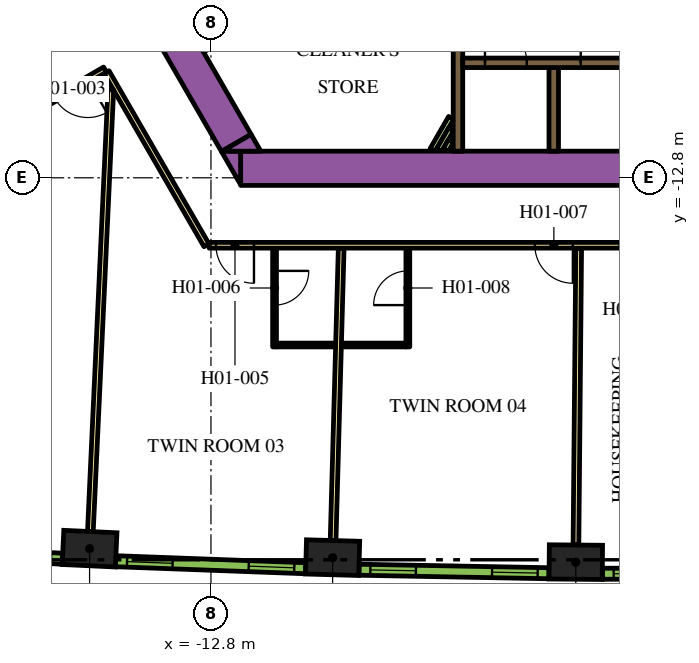
"""IFC4 building model, lengths in metres.
Left out: names, types, materials, properties, quantities, classifications, styles, units other than length and angle.
Written with IfcOpenShell. Run it as: python <this file> out.ifc"""

import sys

from ifc_helpers import new_model, si_unit, direction, frame, frame_2d, origin, origin_2d, place, context, subcontext, project, spatial, polyline, rectangle, outline, extrude, element, fill, save


model = new_model("IFC4")
c1 = context("Model", 3, precision=1e-05, world=origin(), true_north=direction((0.0, 1.0)))
c2 = subcontext(c1, "Body", "Model", "MODEL_VIEW")
j1 = project(units=[si_unit("LENGTHUNIT", "METRE"), si_unit("PLANEANGLEUNIT", "RADIAN")], contexts=[c1])
p1 = place(None, origin())
s1 = spatial("IfcSite", under=j1, at=p1, CompositionType="ELEMENT")
p2 = place(p1, origin())
s2 = spatial("IfcBuilding", under=s1, at=p2, CompositionType="ELEMENT")
p3 = place(p2, frame((0.0, 0.0, 35.4)))
s3 = spatial("IfcBuildingStorey", under=s2, at=p3, CompositionType="ELEMENT", Elevation=35.4)
for number, where, z_axis, x_axis in (
    (1, (-15.994, -22.558, 0.0), (0.0, 0.0, 1.0), (0.999, -0.046, 0.0)),
    (2, (-9.599, -22.795, 0.0), (0.0, 0.0, 1.0), (1.0, -0.028, 0.0)),
    (3, (-3.2, -22.913, 0.0), (0.0, 0.0, 1.0), (1.0, -0.009, 0.0)),
):
    element("IfcColumn", number, at=place(p3, frame(where, z_axis=z_axis, x_axis=x_axis)), inside=s3, PredefinedType="COLUMN", context=c2, shape_type="SweptSolid", body=[
        extrude(rectangle(XDim=1.4, YDim=0.9, at=origin_2d()), origin(), (0.0, 0.0, 1.0), 3.9),
    ])
p4 = place(p3, frame((-12.019, -12.55, 0.0), z_axis=(0.0, 0.0, 1.0), x_axis=(1.0, 0.0, 0.0)))
e4 = element("IfcWall", 4, at=p4, inside=s3, PredefinedType="SOLIDWALL", context=c2, shape_type="SweptSolid", body=[
    extrude(rectangle(XDim=21.63, YDim=0.9, at=frame_2d((10.815, 0.0))), origin(), (0.0, 0.0, 1.0), 3.9),
])
p5 = place(p3, origin())
e5 = element("IfcWall", 5, at=p5, inside=s3, PredefinedType="SOLIDWALL", context=c2, shape_type="SweptSolid", body=[
    extrude(outline(polyline([(-12.529, -12.1), (-12.021, -12.1), (-12.021, -12.98), (-12.529, -12.1)])), origin(), (0.0, 0.0, 1.0), 3.9),
])
p6 = place(p3, frame((-12.134, -11.883, 0.0), z_axis=(0.0, 0.0, 1.0), x_axis=(-0.500005339912, 0.866022320763, 0.0)))
e6 = element("IfcWall", 6, at=p6, inside=s3, PredefinedType="SOLIDWALL", context=c2, shape_type="SweptSolid", body=[
    extrude(rectangle(XDim=9.488, YDim=0.9, at=frame_2d((4.744, 0.0))), origin(), (0.0, 0.0, 1.0), 3.9),
])
e7 = element("IfcWall", 7, at=p5, inside=s3, PredefinedType="SOLIDWALL", context=c2, shape_type="SweptSolid", body=[
    extrude(outline(polyline([(-11.489, -12.1), (-12.505, -12.1), (-11.743, -11.66), (-11.489, -12.1)])), origin(), (0.0, 0.0, 1.0), 3.9),
])
p7 = place(p3, frame((-3.78, -12.1, 0.0), z_axis=(0.0, 0.0, 1.0), x_axis=(0.0, 1.0, 0.0)))
e8 = element("IfcWall", 8, at=p7, inside=s3, PredefinedType="SOLIDWALL", context=c2, shape_type="SweptSolid", body=[
    extrude(rectangle(XDim=2.2, YDim=0.25, at=frame_2d((1.1, 0.0))), origin(), (0.0, 0.0, 1.0), 3.9),
])
p8 = place(p3, frame((-6.3, -12.1, 0.0), z_axis=(0.0, 0.0, 1.0), x_axis=(0.0, 1.0, 0.0)))
e9 = element("IfcWall", 9, at=p8, inside=s3, PredefinedType="SOLIDWALL", context=c2, shape_type="SweptSolid", body=[
    extrude(rectangle(XDim=3.146, YDim=0.25, at=frame_2d((1.573, 0.0))), origin(), (0.0, 0.0, 1.0), 3.9),
])
p9 = place(p3, frame((-6.968, -12.068, 0.0), z_axis=(0.0, 0.0, 1.0), x_axis=(0.49998975084, 0.866031321059, 0.0)))
e10 = element("IfcWall", 10, at=p9, inside=s3, PredefinedType="PARTITIONING", context=c2, shape_type="SweptSolid", body=[
    extrude(rectangle(XDim=0.975, YDim=0.15, at=frame_2d((0.488, 0.0))), origin(), (0.0, 0.0, 1.0), 2.75),
])
p10 = place(p3, frame((-6.794, -12.068, 0.0), z_axis=(0.0, 0.0, 1.0), x_axis=(0.49985693963, 0.866107983974, 0.0)))
e11 = element("IfcWall", 11, at=p10, inside=s3, PredefinedType="PARTITIONING", context=c2, shape_type="SweptSolid", body=[
    extrude(rectangle(XDim=0.629, YDim=0.15, at=frame_2d((0.314, 0.0))), origin(), (0.0, 0.0, 1.0), 2.75),
])
p11 = place(p3, frame((-6.621, -12.068, 0.0), z_axis=(0.0, 0.0, 1.0), x_axis=(0.500046963369, 0.865998287773, 0.0)))
e12 = element("IfcWall", 12, at=p11, inside=s3, PredefinedType="PARTITIONING", context=c2, shape_type="SweptSolid", body=[
    extrude(rectangle(XDim=0.282, YDim=0.15, at=frame_2d((0.141, 0.0))), origin(), (0.0, 0.0, 1.0), 2.75),
])
p12 = place(p3, frame((-6.175, -9.775, 0.0), z_axis=(0.0, 0.0, 1.0), x_axis=(1.0, 0.0, 0.0)))
e13 = element("IfcWall", 13, at=p12, inside=s3, PredefinedType="SOLIDWALL", context=c2, shape_type="SweptSolid", body=[
    extrude(rectangle(XDim=12.35, YDim=0.25, at=frame_2d((6.175, 0.0))), origin(), (0.0, 0.0, 1.0), 3.9),
])
p13 = place(p12, frame((0.585, 0.0, 0.0)))
e14 = element("IfcOpeningElement", 14, at=p13, cuts=e13, PredefinedType="OPENING", context=c2, shape_type="SweptSolid", body=[
    extrude(rectangle(XDim=1.1, YDim=2.1, at=frame_2d((0.55, 1.05))), frame((0.0, 0.135, 0.0), z_axis=(0.0, -1.0, 0.0), x_axis=(1.0, 0.0, 0.0)), (0.0, 0.0, 1.0), 0.27),
])
p14 = place(p12, frame((3.105, 0.0, 0.0)))
e15 = element("IfcOpeningElement", 15, at=p14, cuts=e13, PredefinedType="OPENING", context=c2, shape_type="SweptSolid", body=[
    extrude(rectangle(XDim=1.1, YDim=2.1, at=frame_2d((0.55, 1.05))), frame((0.0, 0.135, 0.0), z_axis=(0.0, -1.0, 0.0), x_axis=(1.0, 0.0, 0.0)), (0.0, 0.0, 1.0), 0.27),
])
p15 = place(p12, frame((5.625, 0.0, 0.0)))
e16 = element("IfcOpeningElement", 16, at=p15, cuts=e13, PredefinedType="OPENING", context=c2, shape_type="SweptSolid", body=[
    extrude(rectangle(XDim=1.1, YDim=2.1, at=frame_2d((0.55, 1.05))), frame((0.0, 0.135, 0.0), z_axis=(0.0, -1.0, 0.0), x_axis=(1.0, 0.0, 0.0)), (0.0, 0.0, 1.0), 0.27),
])
p16 = place(p12, frame((8.145, 0.0, 0.0)))
e17 = element("IfcOpeningElement", 17, at=p16, cuts=e13, PredefinedType="OPENING", context=c2, shape_type="SweptSolid", body=[
    extrude(rectangle(XDim=1.1, YDim=2.1, at=frame_2d((0.55, 1.05))), frame((0.0, 0.135, 0.0), z_axis=(0.0, -1.0, 0.0), x_axis=(1.0, 0.0, 0.0)), (0.0, 0.0, 1.0), 0.27),
])
p17 = place(p12, frame((10.665, 0.0, 0.0)))
e18 = element("IfcOpeningElement", 18, at=p17, cuts=e13, PredefinedType="OPENING", context=c2, shape_type="SweptSolid", body=[
    extrude(rectangle(XDim=1.1, YDim=2.1, at=frame_2d((0.55, 1.05))), frame((0.0, 0.135, 0.0), z_axis=(0.0, -1.0, 0.0), x_axis=(1.0, 0.0, 0.0)), (0.0, 0.0, 1.0), 0.27),
])
p18 = place(p3, frame((-30.463, -16.635, 0.0), z_axis=(0.0, 0.0, 1.0), x_axis=(0.866022394896, 0.500005211512, 0.0)))
e19 = element("IfcWall", 19, at=p18, inside=s3, PredefinedType="PARTITIONING", context=c2, shape_type="SweptSolid", body=[
    extrude(rectangle(XDim=16.144, YDim=0.15, at=frame_2d((8.072, 0.0))), origin(), (0.0, 0.0, 1.0), 2.75),
])
p19 = place(p18, frame((11.004, 0.0, 0.0)))
e20 = element("IfcOpeningElement", 20, at=p19, cuts=e19, PredefinedType="OPENING", context=c2, shape_type="SweptSolid", body=[
    extrude(rectangle(XDim=1.0, YDim=2.1, at=frame_2d((0.5, 1.05))), frame((0.0, 0.085, 0.0), z_axis=(0.0, -1.0, 0.0), x_axis=(1.0, 0.0, 0.0)), (0.0, 0.0, 1.0), 0.17),
])
p20 = place(p18, frame((7.274, 0.0, 0.0)))
e21 = element("IfcOpeningElement", 21, at=p20, cuts=e19, PredefinedType="OPENING", context=c2, shape_type="SweptSolid", body=[
    extrude(rectangle(XDim=1.0, YDim=2.1, at=frame_2d((0.5, 1.05))), frame((0.0, 0.085, 0.0), z_axis=(0.0, -1.0, 0.0), x_axis=(1.0, 0.0, 0.0)), (0.0, 0.0, 1.0), 0.17),
])
p21 = place(p3, frame((-15.587, -9.952, 0.0), z_axis=(0.0, 0.0, 1.0), x_axis=(-0.866022197818, -0.500005552856, 0.0)))
e22 = element("IfcWall", 22, at=p21, inside=s3, PredefinedType="PARTITIONING", context=c2, shape_type="SweptSolid", body=[
    extrude(rectangle(XDim=16.224, YDim=0.15, at=frame_2d((8.112, 0.0))), origin(), (0.0, 0.0, 1.0), 2.75),
])
p22 = place(p21, frame((7.949, 0.0, 0.0)))
e23 = element("IfcOpeningElement", 23, at=p22, cuts=e22, PredefinedType="OPENING", context=c2, shape_type="SweptSolid", body=[
    extrude(rectangle(XDim=1.0, YDim=2.1, at=frame_2d((0.5, 1.05))), frame((0.0, 0.085, 0.0), z_axis=(0.0, -1.0, 0.0), x_axis=(1.0, 0.0, 0.0)), (0.0, 0.0, 1.0), 0.17),
])
p23 = place(p21, frame((0.525, 0.0, 0.0)))
e24 = element("IfcOpeningElement", 24, at=p23, cuts=e22, PredefinedType="OPENING", context=c2, shape_type="SweptSolid", body=[
    extrude(rectangle(XDim=1.0, YDim=2.1, at=frame_2d((0.5, 1.05))), frame((0.0, 0.085, 0.0), z_axis=(0.0, -1.0, 0.0), x_axis=(1.0, 0.0, 0.0)), (0.0, 0.0, 1.0), 0.17),
])
p24 = place(p3, frame((-12.918, -14.575, 0.0), z_axis=(0.0, 0.0, 1.0), x_axis=(-0.500009150678, 0.866020120573, 0.0)))
e25 = element("IfcWall", 25, at=p24, inside=s3, PredefinedType="PARTITIONING", context=c2, shape_type="SweptSolid", body=[
    extrude(rectangle(XDim=5.258, YDim=0.15, at=frame_2d((2.629, 0.0))), origin(), (0.0, 0.0, 1.0), 2.75),
])
p25 = place(p3, frame((12.918, -14.575, 0.0), z_axis=(0.0, 0.0, 1.0), x_axis=(-1.0, 0.0, 0.0)))
e26 = element("IfcWall", 26, at=p25, inside=s3, PredefinedType="PARTITIONING", context=c2, shape_type="SweptSolid", body=[
    extrude(rectangle(XDim=25.766, YDim=0.15, at=frame_2d((12.883, 0.0))), origin(), (0.0, 0.0, 1.0), 2.75),
])
p26 = place(p25, frame((24.586, 0.0, 0.0)))
e27 = element("IfcOpeningElement", 27, at=p26, cuts=e26, PredefinedType="OPENING", context=c2, shape_type="SweptSolid", body=[
    extrude(rectangle(XDim=1.0, YDim=2.1, at=frame_2d((0.5, 1.05))), frame((0.0, 0.085, 0.0), z_axis=(0.0, -1.0, 0.0), x_axis=(1.0, 0.0, 0.0)), (0.0, 0.0, 1.0), 0.17),
])
p27 = place(p25, frame((16.195, 0.0, 0.0)))
e28 = element("IfcOpeningElement", 28, at=p27, cuts=e26, PredefinedType="OPENING", context=c2, shape_type="SweptSolid", body=[
    extrude(rectangle(XDim=1.0, YDim=2.1, at=frame_2d((0.5, 1.05))), frame((0.0, 0.085, 0.0), z_axis=(0.0, -1.0, 0.0), x_axis=(1.0, 0.0, 0.0)), (0.0, 0.0, 1.0), 0.17),
])
p28 = place(p25, frame((14.066, 0.0, 0.0)))
e29 = element("IfcOpeningElement", 29, at=p28, cuts=e26, PredefinedType="OPENING", context=c2, shape_type="SweptSolid", body=[
    extrude(rectangle(XDim=0.9, YDim=2.1, at=frame_2d((0.45, 1.05))), frame((0.0, 0.085, 0.0), z_axis=(0.0, -1.0, 0.0), x_axis=(1.0, 0.0, 0.0)), (0.0, 0.0, 1.0), 0.17),
])
p29 = place(p25, frame((6.824, 0.0, 0.0)))
e30 = element("IfcOpeningElement", 30, at=p29, cuts=e26, PredefinedType="OPENING", context=c2, shape_type="SweptSolid", body=[
    extrude(rectangle(XDim=1.0, YDim=2.1, at=frame_2d((0.5, 1.05))), frame((0.0, 0.085, 0.0), z_axis=(0.0, -1.0, 0.0), x_axis=(1.0, 0.0, 0.0)), (0.0, 0.0, 1.0), 0.17),
])
p30 = place(p25, frame((5.517, 0.0, 0.0)))
e31 = element("IfcOpeningElement", 31, at=p30, cuts=e26, PredefinedType="OPENING", context=c2, shape_type="SweptSolid", body=[
    extrude(rectangle(XDim=1.0, YDim=2.1, at=frame_2d((0.5, 1.05))), frame((0.0, 0.085, 0.0), z_axis=(0.0, -1.0, 0.0), x_axis=(1.0, 0.0, 0.0)), (0.0, 0.0, 1.0), 0.17),
])
p31 = place(p3, frame((-15.973, -22.109, 0.0), z_axis=(0.0, 0.0, 1.0), x_axis=(0.046191717129, 0.998932592955, 0.0)))
e32 = element("IfcWall", 32, at=p31, inside=s3, PredefinedType="PARTITIONING", context=c2, shape_type="SweptSolid", body=[
    extrude(rectangle(XDim=11.638, YDim=0.15, at=frame_2d((5.819, 0.0))), origin(), (0.0, 0.0, 1.0), 2.75),
])
p32 = place(p3, frame((-9.586, -22.345, 0.0), z_axis=(0.0, 0.0, 1.0), x_axis=(0.027722115646, 0.999615668297, 0.0)))
e33 = element("IfcWall", 33, at=p32, inside=s3, PredefinedType="PARTITIONING", context=c2, shape_type="SweptSolid", body=[
    extrude(rectangle(XDim=7.688, YDim=0.15, at=frame_2d((3.844, 0.0))), origin(), (0.0, 0.0, 1.0), 2.75),
])
p33 = place(p3, frame((-3.196, -22.463, 0.0), z_axis=(0.0, 0.0, 1.0), x_axis=(0.00926060032, 0.999957119721, 0.0)))
e34 = element("IfcWall", 34, at=p33, inside=s3, PredefinedType="PARTITIONING", context=c2, shape_type="SweptSolid", body=[
    extrude(rectangle(XDim=7.803, YDim=0.15, at=frame_2d((3.902, 0.0))), origin(), (0.0, 0.0, 1.0), 2.75),
])
p34 = place(p3, frame((-11.127, -14.65, 0.0), z_axis=(0.0, 0.0, 1.0), x_axis=(0.0, -1.0, 0.0)))
e35 = element("IfcWall", 35, at=p34, inside=s3, PredefinedType="PARTITIONING", context=c2, shape_type="SweptSolid", body=[
    extrude(rectangle(XDim=2.6, YDim=0.1, at=frame_2d((1.3, 0.0))), origin(), (0.0, 0.0, 1.0), 2.75),
])
p35 = place(p34, frame((0.6, 0.0, 0.0)))
e36 = element("IfcOpeningElement", 36, at=p35, cuts=e35, PredefinedType="OPENING", context=c2, shape_type="SweptSolid", body=[
    extrude(rectangle(XDim=0.9, YDim=2.1, at=frame_2d((0.45, 1.05))), frame((0.0, 0.06, 0.0), z_axis=(0.0, -1.0, 0.0), x_axis=(1.0, 0.0, 0.0)), (0.0, 0.0, 1.0), 0.12),
])
p36 = place(p3, frame((-11.077, -17.2, 0.0), z_axis=(0.0, 0.0, 1.0), x_axis=(1.0, 0.0, 0.0)))
e37 = element("IfcWall", 37, at=p36, inside=s3, PredefinedType="PARTITIONING", context=c2, shape_type="SweptSolid", body=[
    extrude(rectangle(XDim=1.55, YDim=0.1, at=frame_2d((0.775, 0.0))), origin(), (0.0, 0.0, 1.0), 2.75),
])
p37 = place(p3, frame((-7.619, -17.25, 0.0), z_axis=(0.0, 0.0, 1.0), x_axis=(0.0, 1.0, 0.0)))
e38 = element("IfcWall", 38, at=p37, inside=s3, PredefinedType="PARTITIONING", context=c2, shape_type="SweptSolid", body=[
    extrude(rectangle(XDim=2.6, YDim=0.1, at=frame_2d((1.3, 0.0))), origin(), (0.0, 0.0, 1.0), 2.75),
])
p38 = place(p37, frame((1.1, 0.0, 0.0)))
e39 = element("IfcOpeningElement", 39, at=p38, cuts=e38, PredefinedType="OPENING", context=c2, shape_type="SweptSolid", body=[
    extrude(rectangle(XDim=0.9, YDim=2.1, at=frame_2d((0.45, 1.05))), frame((0.0, 0.06, 0.0), z_axis=(0.0, -1.0, 0.0), x_axis=(1.0, 0.0, 0.0)), (0.0, 0.0, 1.0), 0.12),
])
p39 = place(p3, frame((-7.669, -17.2, 0.0), z_axis=(0.0, 0.0, 1.0), x_axis=(-1.0, 0.0, 0.0)))
e40 = element("IfcWall", 40, at=p39, inside=s3, PredefinedType="PARTITIONING", context=c2, shape_type="SweptSolid", body=[
    extrude(rectangle(XDim=1.69, YDim=0.1, at=frame_2d((0.845, 0.0))), origin(), (0.0, 0.0, 1.0), 2.75),
])
p40 = place(p3, frame((-21.701, -22.547, 0.0), z_axis=(0.0, 0.0, 1.0), x_axis=(0.998464708705, -0.055391564976, 0.0)))
e41 = element("IfcWall", 41, at=p40, inside=s3, PredefinedType="SOLIDWALL", context=c2, shape_type="SweptSolid", body=[
    extrude(rectangle(XDim=4.998, YDim=0.29, at=frame_2d((2.499, 0.0))), origin(), (0.0, 0.0, 1.0), 3.65),
])
p41 = place(p40, frame((0.297, 0.0, 0.9)))
e42 = element("IfcOpeningElement", 42, at=p41, cuts=e41, PredefinedType="OPENING", context=c2, shape_type="SweptSolid", body=[
    extrude(rectangle(XDim=1.2, YDim=2.15, at=frame_2d((0.6, 1.075))), frame((0.0, 0.155, 0.0), z_axis=(0.0, -1.0, 0.0), x_axis=(1.0, 0.0, 0.0)), (0.0, 0.0, 1.0), 0.31),
])
p42 = place(p40, frame((3.501, 0.0, 0.9)))
e43 = element("IfcOpeningElement", 43, at=p42, cuts=e41, PredefinedType="OPENING", context=c2, shape_type="SweptSolid", body=[
    extrude(rectangle(XDim=1.2, YDim=2.15, at=frame_2d((0.6, 1.075))), frame((0.0, 0.155, 0.0), z_axis=(0.0, -1.0, 0.0), x_axis=(1.0, 0.0, 0.0)), (0.0, 0.0, 1.0), 0.31),
])
p43 = place(p3, frame((-15.305, -22.889, 0.0), z_axis=(0.0, 0.0, 1.0), x_axis=(0.999317974969, -0.036926750529, 0.0)))
e44 = element("IfcWall", 44, at=p43, inside=s3, PredefinedType="SOLIDWALL", context=c2, shape_type="SweptSolid", body=[
    extrude(rectangle(XDim=4.998, YDim=0.29, at=frame_2d((2.499, 0.0))), origin(), (0.0, 0.0, 1.0), 3.65),
])
p44 = place(p43, frame((0.297, 0.0, 0.9)))
e45 = element("IfcOpeningElement", 45, at=p44, cuts=e44, PredefinedType="OPENING", context=c2, shape_type="SweptSolid", body=[
    extrude(rectangle(XDim=1.2, YDim=2.15, at=frame_2d((0.6, 1.075))), frame((0.0, 0.155, 0.0), z_axis=(0.0, -1.0, 0.0), x_axis=(1.0, 0.0, 0.0)), (0.0, 0.0, 1.0), 0.31),
])
p45 = place(p43, frame((3.501, 0.0, 0.9)))
e46 = element("IfcOpeningElement", 46, at=p45, cuts=e44, PredefinedType="OPENING", context=c2, shape_type="SweptSolid", body=[
    extrude(rectangle(XDim=1.2, YDim=2.15, at=frame_2d((0.6, 1.075))), frame((0.0, 0.155, 0.0), z_axis=(0.0, -1.0, 0.0), x_axis=(1.0, 0.0, 0.0)), (0.0, 0.0, 1.0), 0.31),
])
p46 = place(p3, frame((-8.904, -23.113, 0.0), z_axis=(0.0, 0.0, 1.0), x_axis=(0.999829529479, -0.018463801951, 0.0)))
e47 = element("IfcWall", 47, at=p46, inside=s3, PredefinedType="SOLIDWALL", context=c2, shape_type="SweptSolid", body=[
    extrude(rectangle(XDim=4.998, YDim=0.29, at=frame_2d((2.499, 0.0))), origin(), (0.0, 0.0, 1.0), 3.65),
])
p47 = place(p46, frame((0.297, 0.0, 0.9)))
e48 = element("IfcOpeningElement", 48, at=p47, cuts=e47, PredefinedType="OPENING", context=c2, shape_type="SweptSolid", body=[
    extrude(rectangle(XDim=1.2, YDim=2.15, at=frame_2d((0.6, 1.075))), frame((0.0, 0.155, 0.0), z_axis=(0.0, -1.0, 0.0), x_axis=(1.0, 0.0, 0.0)), (0.0, 0.0, 1.0), 0.31),
])
p48 = place(p46, frame((3.501, 0.0, 0.9)))
e49 = element("IfcOpeningElement", 49, at=p48, cuts=e47, PredefinedType="OPENING", context=c2, shape_type="SweptSolid", body=[
    extrude(rectangle(XDim=1.2, YDim=2.15, at=frame_2d((0.6, 1.075))), frame((0.0, 0.155, 0.0), z_axis=(0.0, -1.0, 0.0), x_axis=(1.0, 0.0, 0.0)), (0.0, 0.0, 1.0), 0.31),
])
p49 = place(p3, frame((-2.499, -23.218, 0.0), z_axis=(0.0, 0.0, 1.0), x_axis=(1.0, 0.0, 0.0)))
e50 = element("IfcWall", 50, at=p49, inside=s3, PredefinedType="SOLIDWALL", context=c2, shape_type="SweptSolid", body=[
    extrude(rectangle(XDim=4.998, YDim=0.29, at=frame_2d((2.499, 0.0))), origin(), (0.0, 0.0, 1.0), 3.65),
])
p50 = place(p49, frame((0.297, 0.0, 0.9)))
e51 = element("IfcOpeningElement", 51, at=p50, cuts=e50, PredefinedType="OPENING", context=c2, shape_type="SweptSolid", body=[
    extrude(rectangle(XDim=1.2, YDim=2.15, at=frame_2d((0.6, 1.075))), frame((0.0, 0.155, 0.0), z_axis=(0.0, -1.0, 0.0), x_axis=(1.0, 0.0, 0.0)), (0.0, 0.0, 1.0), 0.31),
])
p51 = place(p49, frame((3.501, 0.0, 0.9)))
e52 = element("IfcOpeningElement", 52, at=p51, cuts=e50, PredefinedType="OPENING", context=c2, shape_type="SweptSolid", body=[
    extrude(rectangle(XDim=1.2, YDim=2.15, at=frame_2d((0.6, 1.075))), frame((0.0, 0.155, 0.0), z_axis=(0.0, -1.0, 0.0), x_axis=(1.0, 0.0, 0.0)), (0.0, 0.0, 1.0), 0.31),
])
p52 = place(p13, origin())
e53 = element("IfcDoor", 53, at=p52, inside=s3, OperationType="DOUBLE_DOOR_SLIDING", PredefinedType="DOOR", context=c2, shape_type="SweptSolid", body=[
    extrude(rectangle(XDim=1.1, YDim=2.1, at=frame_2d((0.55, 1.05))), frame((0.0, 0.025, 0.0), z_axis=(0.0, -1.0, 0.0), x_axis=(1.0, 0.0, 0.0)), (0.0, 0.0, 1.0), 0.05),
])
fill(e14, e53)
p53 = place(p14, origin())
e54 = element("IfcDoor", 54, at=p53, inside=s3, OperationType="DOUBLE_DOOR_SLIDING", PredefinedType="DOOR", context=c2, shape_type="SweptSolid", body=[
    extrude(rectangle(XDim=1.1, YDim=2.1, at=frame_2d((0.55, 1.05))), frame((0.0, 0.025, 0.0), z_axis=(0.0, -1.0, 0.0), x_axis=(1.0, 0.0, 0.0)), (0.0, 0.0, 1.0), 0.05),
])
fill(e15, e54)
p54 = place(p23, origin())
e55 = element("IfcDoor", 55, at=p54, inside=s3, OperationType="SINGLE_SWING_LEFT", PredefinedType="DOOR", context=c2, shape_type="SweptSolid", body=[
    extrude(rectangle(XDim=1.0, YDim=2.1, at=frame_2d((0.5, 1.05))), frame((0.0, 0.025, 0.0), z_axis=(0.0, -1.0, 0.0), x_axis=(1.0, 0.0, 0.0)), (0.0, 0.0, 1.0), 0.05),
])
fill(e24, e55)
p55 = place(p26, origin())
e56 = element("IfcDoor", 56, at=p55, inside=s3, OperationType="SINGLE_SWING_RIGHT", PredefinedType="DOOR", context=c2, shape_type="SweptSolid", body=[
    extrude(rectangle(XDim=1.0, YDim=2.1, at=frame_2d((0.5, 1.05))), frame((0.0, 0.025, 0.0), z_axis=(0.0, -1.0, 0.0), x_axis=(1.0, 0.0, 0.0)), (0.0, 0.0, 1.0), 0.05),
])
fill(e27, e56)
p56 = place(p35, origin())
e57 = element("IfcDoor", 57, at=p56, inside=s3, OperationType="SINGLE_SWING_RIGHT", PredefinedType="DOOR", context=c2, shape_type="SweptSolid", body=[
    extrude(rectangle(XDim=0.9, YDim=2.1, at=frame_2d((0.45, 1.05))), frame((0.0, 0.025, 0.0), z_axis=(0.0, -1.0, 0.0), x_axis=(1.0, 0.0, 0.0)), (0.0, 0.0, 1.0), 0.05),
])
fill(e36, e57)
p57 = place(p27, origin())
e58 = element("IfcDoor", 58, at=p57, inside=s3, OperationType="SINGLE_SWING_LEFT", PredefinedType="DOOR", context=c2, shape_type="SweptSolid", body=[
    extrude(rectangle(XDim=1.0, YDim=2.1, at=frame_2d((0.5, 1.05))), frame((0.0, 0.025, 0.0), z_axis=(0.0, -1.0, 0.0), x_axis=(1.0, 0.0, 0.0)), (0.0, 0.0, 1.0), 0.05),
])
fill(e28, e58)
p58 = place(p38, origin())
e59 = element("IfcDoor", 59, at=p58, inside=s3, OperationType="SINGLE_SWING_LEFT", PredefinedType="DOOR", context=c2, shape_type="SweptSolid", body=[
    extrude(rectangle(XDim=0.9, YDim=2.1, at=frame_2d((0.45, 1.05))), frame((0.0, 0.025, 0.0), z_axis=(0.0, -1.0, 0.0), x_axis=(1.0, 0.0, 0.0)), (0.0, 0.0, 1.0), 0.05),
])
fill(e39, e59)
p59 = place(p44, origin())
e60 = element("IfcWindow", 60, at=p59, inside=s3, PartitioningType="DOUBLE_PANEL_VERTICAL", PredefinedType="WINDOW", context=c2, shape_type="SweptSolid", body=[
    extrude(rectangle(XDim=1.2, YDim=2.15, at=frame_2d((0.6, 1.075))), frame((0.0, 0.015, 0.0), z_axis=(0.0, -1.0, 0.0), x_axis=(1.0, 0.0, 0.0)), (0.0, 0.0, 1.0), 0.06),
])
fill(e45, e60)
p60 = place(p45, origin())
e61 = element("IfcWindow", 61, at=p60, inside=s3, PartitioningType="DOUBLE_PANEL_VERTICAL", PredefinedType="WINDOW", context=c2, shape_type="SweptSolid", body=[
    extrude(rectangle(XDim=1.2, YDim=2.15, at=frame_2d((0.6, 1.075))), frame((0.0, 0.015, 0.0), z_axis=(0.0, -1.0, 0.0), x_axis=(1.0, 0.0, 0.0)), (0.0, 0.0, 1.0), 0.06),
])
fill(e46, e61)
p61 = place(p47, origin())
e62 = element("IfcWindow", 62, at=p61, inside=s3, PartitioningType="DOUBLE_PANEL_VERTICAL", PredefinedType="WINDOW", context=c2, shape_type="SweptSolid", body=[
    extrude(rectangle(XDim=1.2, YDim=2.15, at=frame_2d((0.6, 1.075))), frame((0.0, 0.015, 0.0), z_axis=(0.0, -1.0, 0.0), x_axis=(1.0, 0.0, 0.0)), (0.0, 0.0, 1.0), 0.06),
])
fill(e48, e62)
p62 = place(p48, origin())
e63 = element("IfcWindow", 63, at=p62, inside=s3, PartitioningType="DOUBLE_PANEL_VERTICAL", PredefinedType="WINDOW", context=c2, shape_type="SweptSolid", body=[
    extrude(rectangle(XDim=1.2, YDim=2.15, at=frame_2d((0.6, 1.075))), frame((0.0, 0.015, 0.0), z_axis=(0.0, -1.0, 0.0), x_axis=(1.0, 0.0, 0.0)), (0.0, 0.0, 1.0), 0.06),
])
fill(e49, e63)
p63 = place(p50, origin())
e64 = element("IfcWindow", 64, at=p63, inside=s3, PartitioningType="DOUBLE_PANEL_VERTICAL", PredefinedType="WINDOW", context=c2, shape_type="SweptSolid", body=[
    extrude(rectangle(XDim=1.2, YDim=2.15, at=frame_2d((0.6, 1.075))), frame((0.0, 0.015, 0.0), z_axis=(0.0, -1.0, 0.0), x_axis=(1.0, 0.0, 0.0)), (0.0, 0.0, 1.0), 0.06),
])
fill(e51, e64)
save(model, sys.argv[1])
